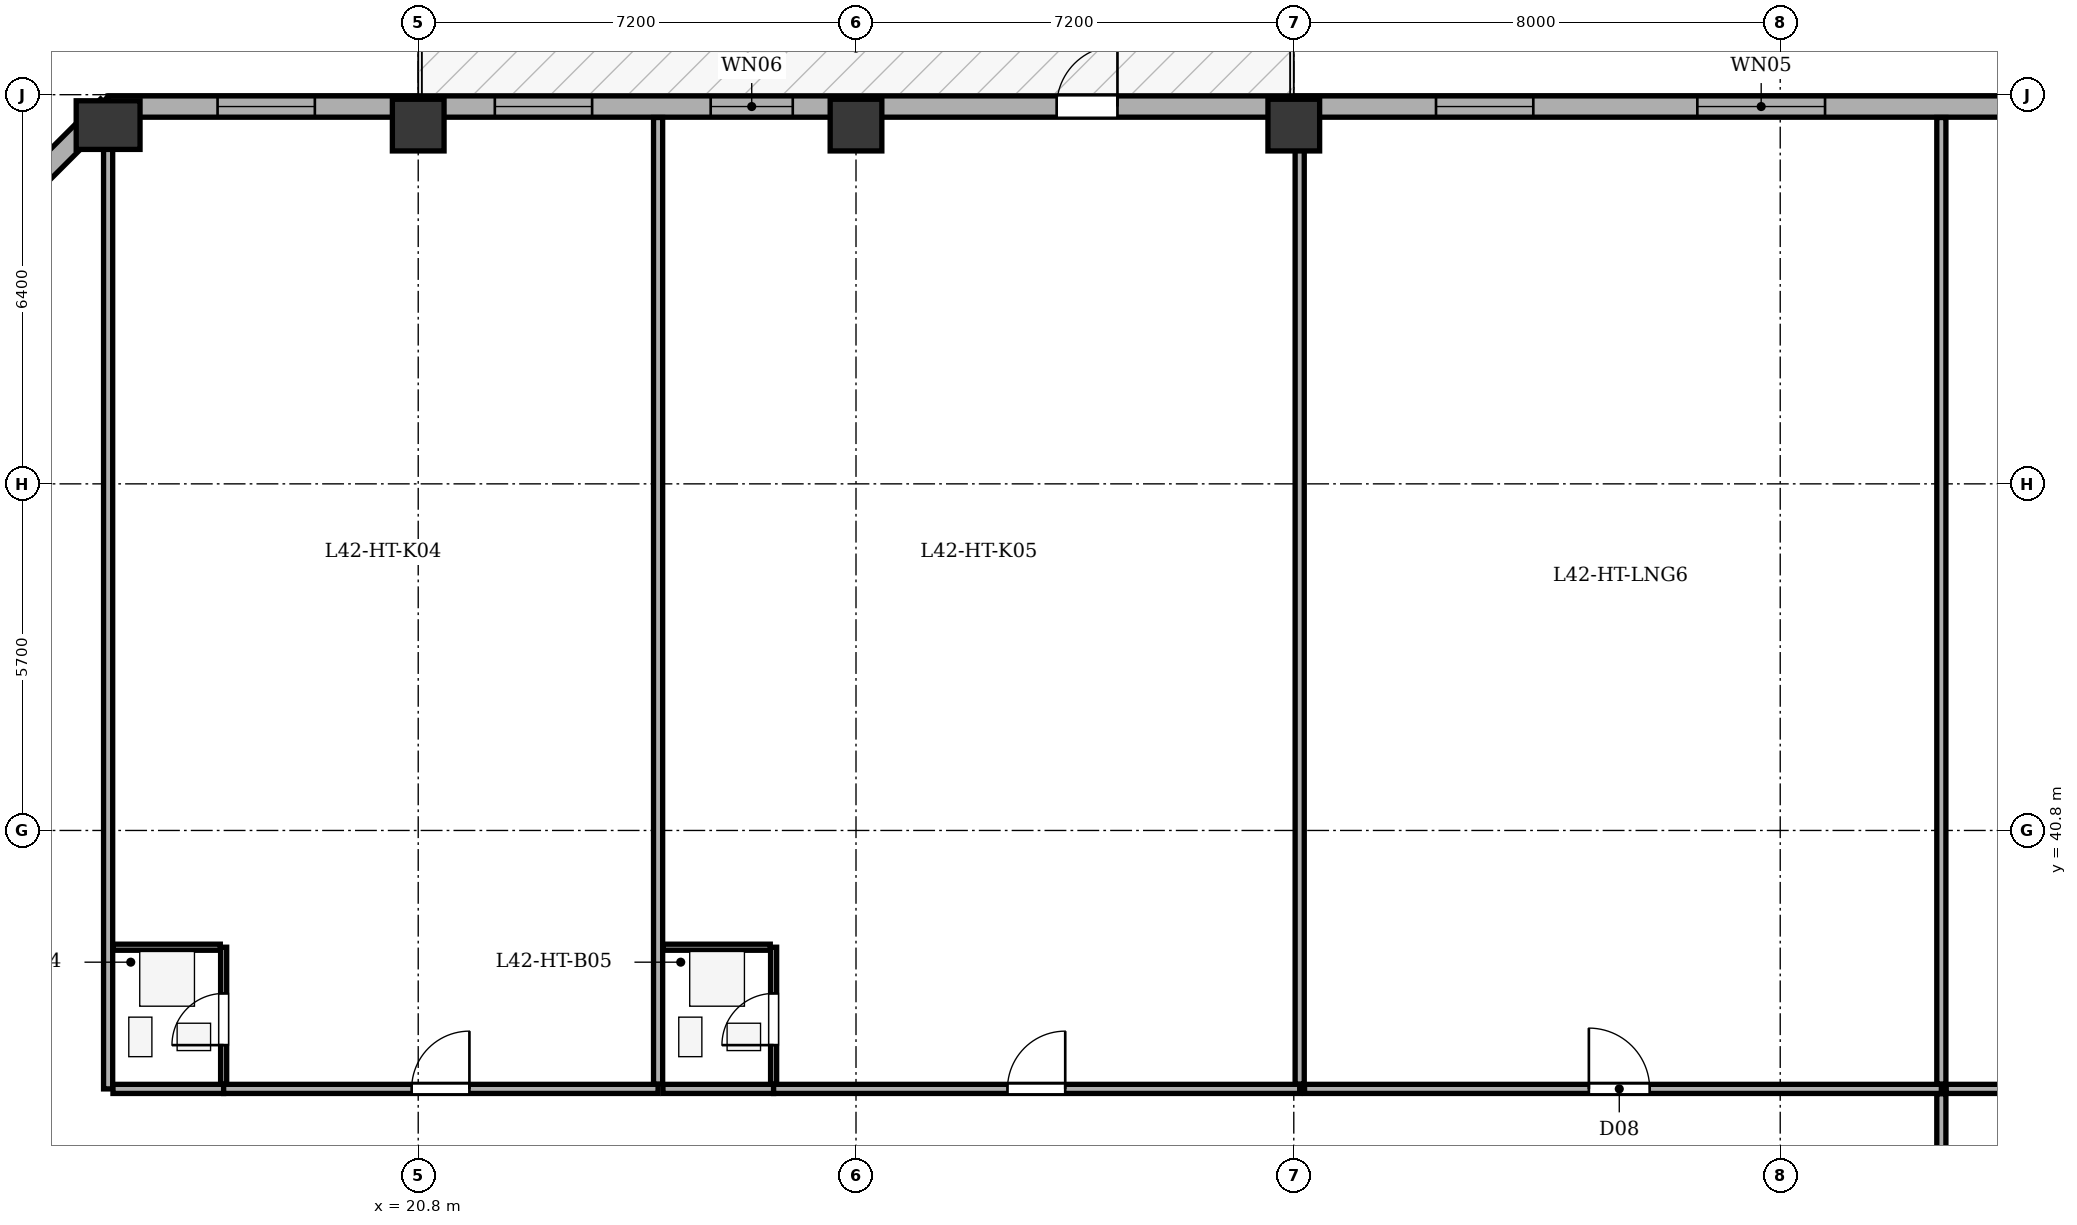
"""IFC4 building model, lengths in metres.
Left out: names, types, materials, properties, quantities, classifications, styles, units other than length and angle.
Written with IfcOpenShell. Run it as: python <this file> out.ifc"""

import sys

from ifc_helpers import new_model, si_unit, direction, frame, frame_2d, origin, origin_2d, place, context, subcontext, project, spatial, rectangle, extrude, element, fill, save


model = new_model("IFC4")
c1 = context("Model", 3, precision=1e-05, world=origin(), true_north=direction((0.0, 1.0)))
c2 = subcontext(c1, "Body", "Model", "MODEL_VIEW")
j1 = project(units=[si_unit("LENGTHUNIT", "METRE"), si_unit("PLANEANGLEUNIT", "RADIAN")], contexts=[c1])
p1 = place(None, origin())
s1 = spatial("IfcSite", under=j1, at=p1, CompositionType="ELEMENT")
p2 = place(p1, origin())
s2 = spatial("IfcBuilding", under=s1, at=p2, CompositionType="ELEMENT")
p3 = place(p2, frame((0.0, 0.0, 165.8)))
s3 = spatial("IfcBuildingStorey", under=s2, at=p3, CompositionType="ELEMENT", Elevation=165.8)
p4 = place(p3, frame((15.7, 52.4, 0.0), z_axis=(0.0, 0.0, 1.0), x_axis=(1.0, 0.0, 0.0)))
e1 = element("IfcColumn", 1, at=p4, inside=s3, PredefinedType="COLUMN", context=c2, shape_type="SweptSolid", body=[
    extrude(rectangle(XDim=0.8, YDim=1.05, at=origin_2d()), origin(), (0.0, 0.0, 1.0), 3.5),
])
for number, where, z_axis, x_axis in (
    (2, (20.8, 52.4, 0.0), (0.0, 0.0, 1.0), (1.0, 0.0, 0.0)),
    (3, (28.0, 52.4, 0.0), (0.0, 0.0, 1.0), (1.0, 0.0, 0.0)),
    (4, (35.2, 52.4, 0.0), (0.0, 0.0, 1.0), (1.0, 0.0, 0.0)),
):
    element("IfcColumn", number, at=place(p3, frame(where, z_axis=z_axis, x_axis=x_axis)), inside=s3, PredefinedType="COLUMN", context=c2, shape_type="SweptSolid", body=[
        extrude(rectangle(XDim=0.85, YDim=0.85, at=origin_2d()), origin(), (0.0, 0.0, 1.0), 3.5),
    ])
p5 = place(p3, frame((10.895, 47.9, 0.0), z_axis=(0.0, 0.0, 1.0), x_axis=(0.707088817216, 0.7071247447, 0.0)))
e5 = element("IfcWall", 5, at=p5, inside=s3, PredefinedType="STANDARD", context=c2, shape_type="SweptSolid", body=[
    extrude(rectangle(XDim=6.795, YDim=0.35, at=frame_2d((3.398, 0.0))), origin(), (0.0, 0.0, 1.0), 2.785),
])
p6 = place(p5, frame((2.698, 0.0, 0.75)))
e6 = element("IfcOpeningElement", 6, at=p6, cuts=e5, PredefinedType="OPENING", context=c2, shape_type="SweptSolid", body=[
    extrude(rectangle(XDim=1.4, YDim=1.65, at=frame_2d((0.7, 0.825))), frame((0.0, 0.185, 0.0), z_axis=(0.0, -1.0, 0.0), x_axis=(1.0, 0.0, 0.0)), (0.0, 0.0, 1.0), 0.37),
])
p7 = place(p3, frame((15.7, 52.705, 0.0), z_axis=(0.0, 0.0, 1.0), x_axis=(1.0, 0.0, 0.0)))
e7 = element("IfcWall", 7, at=p7, inside=s3, PredefinedType="STANDARD", context=c2, shape_type="SweptSolid", body=[
    extrude(rectangle(XDim=35.0, YDim=0.35, at=frame_2d((17.5, 0.0))), origin(), (0.0, 0.0, 1.0), 2.785),
])
p8 = place(p7, frame((15.6, 0.0, 0.0)))
e8 = element("IfcOpeningElement", 8, at=p8, cuts=e7, PredefinedType="OPENING", context=c2, shape_type="SweptSolid", body=[
    extrude(rectangle(XDim=1.0, YDim=2.02, at=frame_2d((0.5, 1.01))), frame((0.0, 0.185, 0.0), z_axis=(0.0, -1.0, 0.0), x_axis=(1.0, 0.0, 0.0)), (0.0, 0.0, 1.0), 0.37),
])
p9 = place(p7, frame((1.8, 0.0, 0.75)))
e9 = element("IfcOpeningElement", 9, at=p9, cuts=e7, PredefinedType="OPENING", context=c2, shape_type="SweptSolid", body=[
    extrude(rectangle(XDim=1.6, YDim=1.75, at=frame_2d((0.8, 0.875))), frame((0.0, 0.185, 0.0), z_axis=(0.0, -1.0, 0.0), x_axis=(1.0, 0.0, 0.0)), (0.0, 0.0, 1.0), 0.37),
])
p10 = place(p7, frame((6.36, 0.0, 0.75)))
e10 = element("IfcOpeningElement", 10, at=p10, cuts=e7, PredefinedType="OPENING", context=c2, shape_type="SweptSolid", body=[
    extrude(rectangle(XDim=1.6, YDim=1.75, at=frame_2d((0.8, 0.875))), frame((0.0, 0.185, 0.0), z_axis=(0.0, -1.0, 0.0), x_axis=(1.0, 0.0, 0.0)), (0.0, 0.0, 1.0), 0.37),
])
p11 = place(p7, frame((9.91, 0.0, 0.75)))
e11 = element("IfcOpeningElement", 11, at=p11, cuts=e7, PredefinedType="OPENING", context=c2, shape_type="SweptSolid", body=[
    extrude(rectangle(XDim=1.35, YDim=1.75, at=frame_2d((0.675, 0.875))), frame((0.0, 0.185, 0.0), z_axis=(0.0, -1.0, 0.0), x_axis=(1.0, 0.0, 0.0)), (0.0, 0.0, 1.0), 0.37),
])
p12 = place(p7, frame((21.839, 0.0, 0.75)))
e12 = element("IfcOpeningElement", 12, at=p12, cuts=e7, PredefinedType="OPENING", context=c2, shape_type="SweptSolid", body=[
    extrude(rectangle(XDim=1.6, YDim=1.75, at=frame_2d((0.8, 0.875))), frame((0.0, 0.185, 0.0), z_axis=(0.0, -1.0, 0.0), x_axis=(1.0, 0.0, 0.0)), (0.0, 0.0, 1.0), 0.37),
])
p13 = place(p7, frame((26.137, 0.0, 0.75)))
e13 = element("IfcOpeningElement", 13, at=p13, cuts=e7, PredefinedType="OPENING", context=c2, shape_type="SweptSolid", body=[
    extrude(rectangle(XDim=2.1, YDim=1.75, at=frame_2d((1.05, 0.875))), frame((0.0, 0.185, 0.0), z_axis=(0.0, -1.0, 0.0), x_axis=(1.0, 0.0, 0.0)), (0.0, 0.0, 1.0), 0.37),
])
p14 = place(p7, frame((31.637, 0.0, 0.75)))
e14 = element("IfcOpeningElement", 14, at=p14, cuts=e7, PredefinedType="OPENING", context=c2, shape_type="SweptSolid", body=[
    extrude(rectangle(XDim=1.6, YDim=1.75, at=frame_2d((0.8, 0.875))), frame((0.0, 0.185, 0.0), z_axis=(0.0, -1.0, 0.0), x_axis=(1.0, 0.0, 0.0)), (0.0, 0.0, 1.0), 0.37),
])
p15 = place(p3, frame((15.7, 36.55, 0.0), z_axis=(0.0, 0.0, 1.0), x_axis=(0.0, 1.0, 0.0)))
e15 = element("IfcWall", 15, at=p15, inside=s3, PredefinedType="PARTITIONING", context=c2, shape_type="SweptSolid", body=[
    extrude(rectangle(XDim=15.975, YDim=0.15, at=frame_2d((7.987, 0.0))), origin(), (0.0, 0.0, 1.0), 3.2),
])
p16 = place(p3, frame((15.78, 36.55, 0.0), z_axis=(0.0, 0.0, 1.0), x_axis=(1.0, 0.0, 0.0)))
e16 = element("IfcWall", 16, at=p16, inside=s3, PredefinedType="PARTITIONING", context=c2, shape_type="SweptSolid", body=[
    extrude(rectangle(XDim=1.82, YDim=0.15, at=frame_2d((0.91, 0.0))), origin(), (0.0, 0.0, 1.0), 3.2),
])
p17 = place(p3, frame((17.6, 36.55, 0.0), z_axis=(0.0, 0.0, 1.0), x_axis=(1.0, 0.0, 0.0)))
e17 = element("IfcWall", 17, at=p17, inside=s3, PredefinedType="PARTITIONING", context=c2, shape_type="SweptSolid", body=[
    extrude(rectangle(XDim=7.145, YDim=0.15, at=frame_2d((3.573, 0.0))), origin(), (0.0, 0.0, 1.0), 3.2),
])
p18 = place(p17, frame((3.092, 0.0, 0.0)))
e18 = element("IfcOpeningElement", 18, at=p18, cuts=e17, PredefinedType="OPENING", context=c2, shape_type="SweptSolid", body=[
    extrude(rectangle(XDim=0.95, YDim=2.1, at=frame_2d((0.475, 1.05))), frame((0.0, 0.085, 0.0), z_axis=(0.0, -1.0, 0.0), x_axis=(1.0, 0.0, 0.0)), (0.0, 0.0, 1.0), 0.17),
])
p19 = place(p3, frame((17.6, 36.63, 0.0), z_axis=(0.0, 0.0, 1.0), x_axis=(0.0, 1.0, 0.0)))
e19 = element("IfcWall", 19, at=p19, inside=s3, PredefinedType="PARTITIONING", context=c2, shape_type="SweptSolid", body=[
    extrude(rectangle(XDim=2.25, YDim=0.1, at=frame_2d((1.125, 0.0))), origin(), (0.0, 0.0, 1.0), 3.2),
])
p20 = place(p19, frame((0.64, 0.0, 0.0)))
e20 = element("IfcOpeningElement", 20, at=p20, cuts=e19, PredefinedType="OPENING", context=c2, shape_type="SweptSolid", body=[
    extrude(rectangle(XDim=0.85, YDim=2.05, at=frame_2d((0.425, 1.025))), frame((0.0, 0.06, 0.0), z_axis=(0.0, -1.0, 0.0), x_axis=(1.0, 0.0, 0.0)), (0.0, 0.0, 1.0), 0.12),
])
p21 = place(p3, frame((15.78, 38.88, 0.0), z_axis=(0.0, 0.0, 1.0), x_axis=(1.0, 0.0, 0.0)))
e21 = element("IfcWall", 21, at=p21, inside=s3, PredefinedType="PARTITIONING", context=c2, shape_type="SweptSolid", body=[
    extrude(rectangle(XDim=1.765, YDim=0.1, at=frame_2d((0.882, 0.0))), origin(), (0.0, 0.0, 1.0), 3.2),
])
p22 = place(p3, frame((24.745, 36.63, 0.0), z_axis=(0.0, 0.0, 1.0), x_axis=(0.0, 1.0, 0.0)))
e22 = element("IfcWall", 22, at=p22, inside=s3, PredefinedType="PARTITIONING", context=c2, shape_type="SweptSolid", body=[
    extrude(rectangle(XDim=15.895, YDim=0.15, at=frame_2d((7.948, 0.0))), origin(), (0.0, 0.0, 1.0), 3.2),
])
p23 = place(p3, frame((24.825, 36.55, 0.0), z_axis=(0.0, 0.0, 1.0), x_axis=(1.0, 0.0, 0.0)))
e23 = element("IfcWall", 23, at=p23, inside=s3, PredefinedType="PARTITIONING", context=c2, shape_type="SweptSolid", body=[
    extrude(rectangle(XDim=1.82, YDim=0.15, at=frame_2d((0.91, 0.0))), origin(), (0.0, 0.0, 1.0), 3.2),
])
p24 = place(p3, frame((26.645, 36.55, 0.0), z_axis=(0.0, 0.0, 1.0), x_axis=(1.0, 0.0, 0.0)))
e24 = element("IfcWall", 24, at=p24, inside=s3, PredefinedType="PARTITIONING", context=c2, shape_type="SweptSolid", body=[
    extrude(rectangle(XDim=8.652, YDim=0.15, at=frame_2d((4.326, 0.0))), origin(), (0.0, 0.0, 1.0), 3.2),
])
p25 = place(p24, frame((3.846, 0.0, 0.0)))
e25 = element("IfcOpeningElement", 25, at=p25, cuts=e24, PredefinedType="OPENING", context=c2, shape_type="SweptSolid", body=[
    extrude(rectangle(XDim=0.95, YDim=2.1, at=frame_2d((0.475, 1.05))), frame((0.0, 0.085, 0.0), z_axis=(0.0, -1.0, 0.0), x_axis=(1.0, 0.0, 0.0)), (0.0, 0.0, 1.0), 0.17),
])
p26 = place(p3, frame((26.645, 36.63, 0.0), z_axis=(0.0, 0.0, 1.0), x_axis=(0.0, 1.0, 0.0)))
e26 = element("IfcWall", 26, at=p26, inside=s3, PredefinedType="PARTITIONING", context=c2, shape_type="SweptSolid", body=[
    extrude(rectangle(XDim=2.25, YDim=0.1, at=frame_2d((1.125, 0.0))), origin(), (0.0, 0.0, 1.0), 3.2),
])
p27 = place(p26, frame((0.64, 0.0, 0.0)))
e27 = element("IfcOpeningElement", 27, at=p27, cuts=e26, PredefinedType="OPENING", context=c2, shape_type="SweptSolid", body=[
    extrude(rectangle(XDim=0.85, YDim=2.05, at=frame_2d((0.425, 1.025))), frame((0.0, 0.06, 0.0), z_axis=(0.0, -1.0, 0.0), x_axis=(1.0, 0.0, 0.0)), (0.0, 0.0, 1.0), 0.12),
])
p28 = place(p3, frame((24.825, 38.88, 0.0), z_axis=(0.0, 0.0, 1.0), x_axis=(1.0, 0.0, 0.0)))
e28 = element("IfcWall", 28, at=p28, inside=s3, PredefinedType="PARTITIONING", context=c2, shape_type="SweptSolid", body=[
    extrude(rectangle(XDim=1.765, YDim=0.1, at=frame_2d((0.883, 0.0))), origin(), (0.0, 0.0, 1.0), 3.2),
])
p29 = place(p3, frame((35.297, 36.63, 0.0), z_axis=(0.0, 0.0, 1.0), x_axis=(0.0, 1.0, 0.0)))
e29 = element("IfcWall", 29, at=p29, inside=s3, PredefinedType="PARTITIONING", context=c2, shape_type="SweptSolid", body=[
    extrude(rectangle(XDim=15.895, YDim=0.15, at=frame_2d((7.948, 0.0))), origin(), (0.0, 0.0, 1.0), 2.535),
])
p30 = place(p3, frame((35.377, 36.55, 0.0), z_axis=(0.0, 0.0, 1.0), x_axis=(1.0, 0.0, 0.0)))
e30 = element("IfcWall", 30, at=p30, inside=s3, PredefinedType="PARTITIONING", context=c2, shape_type="SweptSolid", body=[
    extrude(rectangle(XDim=10.473, YDim=0.15, at=frame_2d((5.237, 0.0))), origin(), (0.0, 0.0, 1.0), 3.2),
])
p31 = place(p30, frame((4.676, 0.0, 0.0)))
e31 = element("IfcOpeningElement", 31, at=p31, cuts=e30, PredefinedType="OPENING", context=c2, shape_type="SweptSolid", body=[
    extrude(rectangle(XDim=1.0, YDim=2.1, at=frame_2d((0.5, 1.05))), frame((0.0, 0.085, 0.0), z_axis=(0.0, -1.0, 0.0), x_axis=(1.0, 0.0, 0.0)), (0.0, 0.0, 1.0), 0.17),
])
p32 = place(p3, frame((45.85, 36.63, 0.0), z_axis=(0.0, 0.0, 1.0), x_axis=(0.0, 1.0, 0.0)))
e32 = element("IfcWall", 32, at=p32, inside=s3, PredefinedType="PARTITIONING", context=c2, shape_type="SweptSolid", body=[
    extrude(rectangle(XDim=15.895, YDim=0.15, at=frame_2d((7.948, 0.0))), origin(), (0.0, 0.0, 1.0), 3.2),
])
p33 = place(p3, frame((45.93, 36.55, 0.0), z_axis=(0.0, 0.0, 1.0), x_axis=(1.0, 0.0, 0.0)))
e33 = element("IfcWall", 33, at=p33, inside=s3, PredefinedType="PARTITIONING", context=c2, shape_type="SweptSolid", body=[
    extrude(rectangle(XDim=9.395, YDim=0.15, at=frame_2d((4.698, 0.0))), origin(), (0.0, 0.0, 1.0), 3.2),
])
p34 = place(p3, frame((45.85, 17.93, 0.0), z_axis=(0.0, 0.0, 1.0), x_axis=(0.0, 1.0, 0.0)))
e34 = element("IfcWall", 34, at=p34, inside=s3, PredefinedType="PARTITIONING", context=c2, shape_type="SweptSolid", body=[
    extrude(rectangle(XDim=18.54, YDim=0.15, at=frame_2d((9.27, 0.0))), origin(), (0.0, 0.0, 1.0), 3.2),
])
p35 = place(p34, frame((8.79, 0.0, 0.0)))
e35 = element("IfcOpeningElement", 35, at=p35, cuts=e34, PredefinedType="OPENING", context=c2, shape_type="SweptSolid", body=[
    extrude(rectangle(XDim=0.95, YDim=2.1, at=frame_2d((0.475, 1.05))), frame((0.0, 0.085, 0.0), z_axis=(0.0, -1.0, 0.0), x_axis=(1.0, 0.0, 0.0)), (0.0, 0.0, 1.0), 0.17),
])
p36 = place(p8, origin())
e36 = element("IfcDoor", 36, at=p36, inside=s3, OperationType="SINGLE_SWING_RIGHT", PredefinedType="DOOR", context=c2, shape_type="SweptSolid", body=[
    extrude(rectangle(XDim=1.0, YDim=2.02, at=frame_2d((0.5, 1.01))), frame((0.0, 0.025, 0.0), z_axis=(0.0, -1.0, 0.0), x_axis=(1.0, 0.0, 0.0)), (0.0, 0.0, 1.0), 0.05),
])
fill(e8, e36)
p37 = place(p9, origin())
e37 = element("IfcWindow", 37, at=p37, inside=s3, PartitioningType="SINGLE_PANEL", PredefinedType="WINDOW", context=c2, shape_type="SweptSolid", body=[
    extrude(rectangle(XDim=1.6, YDim=1.75, at=frame_2d((0.8, 0.875))), frame((0.0, -0.01, 0.0), z_axis=(0.0, -1.0, 0.0), x_axis=(1.0, 0.0, 0.0)), (0.0, 0.0, 1.0), 0.06),
])
fill(e9, e37)
p38 = place(p10, origin())
e38 = element("IfcWindow", 38, at=p38, inside=s3, PartitioningType="SINGLE_PANEL", PredefinedType="WINDOW", context=c2, shape_type="SweptSolid", body=[
    extrude(rectangle(XDim=1.6, YDim=1.75, at=frame_2d((0.8, 0.875))), frame((0.0, -0.01, 0.0), z_axis=(0.0, -1.0, 0.0), x_axis=(1.0, 0.0, 0.0)), (0.0, 0.0, 1.0), 0.06),
])
fill(e10, e38)
p39 = place(p11, origin())
e39 = element("IfcWindow", 39, at=p39, inside=s3, PartitioningType="SINGLE_PANEL", PredefinedType="WINDOW", context=c2, shape_type="SweptSolid", body=[
    extrude(rectangle(XDim=1.35, YDim=1.75, at=frame_2d((0.675, 0.875))), frame((0.0, -0.01, 0.0), z_axis=(0.0, -1.0, 0.0), x_axis=(1.0, 0.0, 0.0)), (0.0, 0.0, 1.0), 0.06),
])
fill(e11, e39)
p40 = place(p12, origin())
e40 = element("IfcWindow", 40, at=p40, inside=s3, PartitioningType="SINGLE_PANEL", PredefinedType="WINDOW", context=c2, shape_type="SweptSolid", body=[
    extrude(rectangle(XDim=1.6, YDim=1.75, at=frame_2d((0.8, 0.875))), frame((0.0, -0.01, 0.0), z_axis=(0.0, -1.0, 0.0), x_axis=(1.0, 0.0, 0.0)), (0.0, 0.0, 1.0), 0.06),
])
fill(e12, e40)
p41 = place(p13, origin())
e41 = element("IfcWindow", 41, at=p41, inside=s3, PartitioningType="SINGLE_PANEL", PredefinedType="WINDOW", context=c2, shape_type="SweptSolid", body=[
    extrude(rectangle(XDim=2.1, YDim=1.75, at=frame_2d((1.05, 0.875))), frame((0.0, -0.01, 0.0), z_axis=(0.0, -1.0, 0.0), x_axis=(1.0, 0.0, 0.0)), (0.0, 0.0, 1.0), 0.06),
])
fill(e13, e41)
p42 = place(p20, origin())
e42 = element("IfcDoor", 42, at=p42, inside=s3, OperationType="SINGLE_SWING_LEFT", PredefinedType="DOOR", context=c2, shape_type="SweptSolid", body=[
    extrude(rectangle(XDim=0.85, YDim=2.05, at=frame_2d((0.425, 1.025))), frame((0.0, 0.025, 0.0), z_axis=(0.0, -1.0, 0.0), x_axis=(1.0, 0.0, 0.0)), (0.0, 0.0, 1.0), 0.05),
])
fill(e20, e42)
p43 = place(p18, origin())
e43 = element("IfcDoor", 43, at=p43, inside=s3, OperationType="SINGLE_SWING_RIGHT", PredefinedType="DOOR", context=c2, shape_type="SweptSolid", body=[
    extrude(rectangle(XDim=0.95, YDim=2.1, at=frame_2d((0.475, 1.05))), frame((0.0, 0.025, 0.0), z_axis=(0.0, -1.0, 0.0), x_axis=(1.0, 0.0, 0.0)), (0.0, 0.0, 1.0), 0.05),
])
fill(e18, e43)
p44 = place(p27, origin())
e44 = element("IfcDoor", 44, at=p44, inside=s3, OperationType="SINGLE_SWING_LEFT", PredefinedType="DOOR", context=c2, shape_type="SweptSolid", body=[
    extrude(rectangle(XDim=0.85, YDim=2.05, at=frame_2d((0.425, 1.025))), frame((0.0, 0.025, 0.0), z_axis=(0.0, -1.0, 0.0), x_axis=(1.0, 0.0, 0.0)), (0.0, 0.0, 1.0), 0.05),
])
fill(e27, e44)
p45 = place(p25, origin())
e45 = element("IfcDoor", 45, at=p45, inside=s3, OperationType="SINGLE_SWING_RIGHT", PredefinedType="DOOR", context=c2, shape_type="SweptSolid", body=[
    extrude(rectangle(XDim=0.95, YDim=2.1, at=frame_2d((0.475, 1.05))), frame((0.0, 0.025, 0.0), z_axis=(0.0, -1.0, 0.0), x_axis=(1.0, 0.0, 0.0)), (0.0, 0.0, 1.0), 0.05),
])
fill(e25, e45)
p46 = place(p31, origin())
e46 = element("IfcDoor", 46, at=p46, inside=s3, OperationType="SINGLE_SWING_LEFT", PredefinedType="DOOR", context=c2, shape_type="SweptSolid", body=[
    extrude(rectangle(XDim=1.0, YDim=2.1, at=frame_2d((0.5, 1.05))), frame((0.0, 0.025, 0.0), z_axis=(0.0, -1.0, 0.0), x_axis=(1.0, 0.0, 0.0)), (0.0, 0.0, 1.0), 0.05),
])
fill(e31, e46)
save(model, sys.argv[1])
